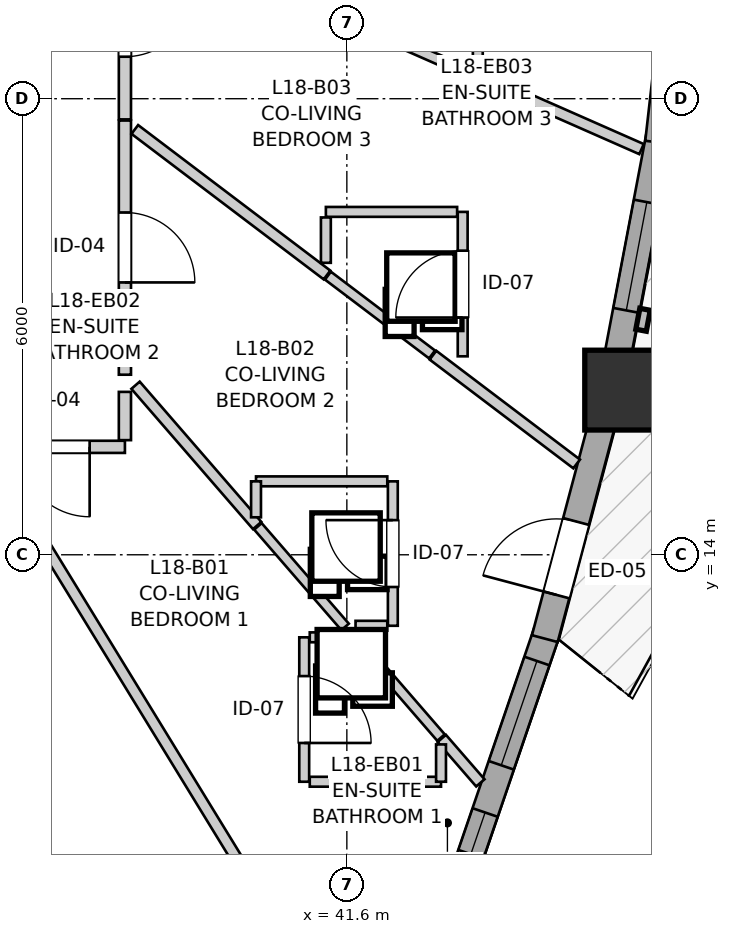
"""IFC4 building model, lengths in metres.
Left out: names, types, materials, properties, quantities, classifications, styles, units other than length and angle.
Written with IfcOpenShell. Run it as: python <this file> out.ifc"""

import sys

from ifc_helpers import new_model, si_unit, direction, frame, frame_2d, origin, origin_2d, place, context, subcontext, project, spatial, rectangle, extrude, source, transform, mapped, element, fill, save


model = new_model("IFC4")
c1 = context("Model", 3, precision=1e-05, world=origin(), true_north=direction((0.0, 1.0)))
c2 = subcontext(c1, "Body", "Model", "MODEL_VIEW")
j1 = project(units=[si_unit("LENGTHUNIT", "METRE"), si_unit("PLANEANGLEUNIT", "RADIAN")], contexts=[c1])
p1 = place(None, origin())
s1 = spatial("IfcSite", under=j1, at=p1, CompositionType="ELEMENT")
p2 = place(p1, origin())
s2 = spatial("IfcBuilding", under=s1, at=p2, CompositionType="ELEMENT")
p3 = place(p2, frame((0.0, 0.0, 62.2)))
s3 = spatial("IfcBuildingStorey", under=s2, at=p3, CompositionType="ELEMENT", Elevation=62.2)
m1 = source(origin(), c2, "Body", "SweptSolid", [
    extrude(rectangle(XDim=1.05, YDim=1.05, at=origin_2d()), origin(), (0.0, 0.0, 1.0), 2.9),
])
p4 = place(p3, frame((45.256, 16.166, 0.0), z_axis=(0.0, 0.0, 1.0), x_axis=(1.0, 0.0, 0.0)))
e1 = element("IfcColumn", 1, at=p4, inside=s3, PredefinedType="COLUMN", context=c2, shape_type="MappedRepresentation", body=[
    mapped(m1, transform((0.0, 0.0, 0.0), x_axis=(1.0, 0.0, 0.0), y_axis=(0.0, 1.0, 0.0), z_axis=(0.0, 0.0, 1.0), scale=1.0)),
])
p5 = place(p3, frame((43.104, 9.686, 0.0), z_axis=(0.0, 0.0, 1.0), x_axis=(0.323558843572, 0.946208050455, 0.0)))
e2 = element("IfcWall", 2, at=p5, inside=s3, PredefinedType="SOLIDWALL", context=c2, shape_type="SweptSolid", body=[
    extrude(rectangle(XDim=3.482, YDim=0.35, at=frame_2d((1.741, 0.0))), origin(), (0.0, 0.0, 1.0), 2.38),
])
p6 = place(p5, frame((0.396, 0.0, 0.82)))
e3 = element("IfcOpeningElement", 3, at=p6, cuts=e2, PredefinedType="OPENING", context=c2, shape_type="SweptSolid", body=[
    extrude(rectangle(XDim=0.58, YDim=1.35, at=frame_2d((0.29, 0.675))), frame((0.0, 0.185, 0.0), z_axis=(0.0, -1.0, 0.0), x_axis=(1.0, 0.0, 0.0)), (0.0, 0.0, 1.0), 0.37),
])
p7 = place(p5, frame((1.632, 0.0, 0.82)))
e4 = element("IfcOpeningElement", 4, at=p7, cuts=e2, PredefinedType="OPENING", context=c2, shape_type="SweptSolid", body=[
    extrude(rectangle(XDim=1.45, YDim=1.25, at=frame_2d((0.725, 0.625))), frame((0.0, 0.185, 0.0), z_axis=(0.0, -1.0, 0.0), x_axis=(1.0, 0.0, 0.0)), (0.0, 0.0, 1.0), 0.37),
])
p8 = place(p3, frame((44.205, 12.897, 0.0), z_axis=(0.0, 0.0, 1.0), x_axis=(0.257099428233, 0.966384956424, 0.0)))
e5 = element("IfcWall", 5, at=p8, inside=s3, PredefinedType="SOLIDWALL", context=c2, shape_type="SweptSolid", body=[
    extrude(rectangle(XDim=3.13, YDim=0.35, at=frame_2d((1.565, 0.0))), origin(), (0.0, 0.0, 1.0), 2.38),
])
p9 = place(p8, frame((0.595, 0.0, 0.0)))
e6 = element("IfcOpeningElement", 6, at=p9, cuts=e5, PredefinedType="OPENING", context=c2, shape_type="SweptSolid", body=[
    extrude(rectangle(XDim=1.0, YDim=2.1, at=frame_2d((0.5, 1.05))), frame((0.0, 0.185, 0.0), z_axis=(0.0, -1.0, 0.0), x_axis=(1.0, 0.0, 0.0)), (0.0, 0.0, 1.0), 0.37),
])
p10 = place(p3, frame((45.14, 16.494, 0.0), z_axis=(0.0, 0.0, 1.0), x_axis=(0.186608529586, 0.982434352354, 0.0)))
e7 = element("IfcWall", 7, at=p10, inside=s3, PredefinedType="SOLIDWALL", context=c2, shape_type="SweptSolid", body=[
    extrude(rectangle(XDim=3.074, YDim=0.35, at=frame_2d((1.537, 0.0))), origin(), (0.0, 0.0, 1.0), 2.38),
])
p11 = place(p10, frame((0.734, 0.0, 0.82)))
e8 = element("IfcOpeningElement", 8, at=p11, cuts=e7, PredefinedType="OPENING", context=c2, shape_type="SweptSolid", body=[
    extrude(rectangle(XDim=1.45, YDim=1.25, at=frame_2d((0.725, 0.625))), frame((0.0, 0.185, 0.0), z_axis=(0.0, -1.0, 0.0), x_axis=(1.0, 0.0, 0.0)), (0.0, 0.0, 1.0), 0.37),
])
p12 = place(p3, frame((45.7, 19.426, 0.0), z_axis=(0.0, 0.0, 1.0), x_axis=(0.113266370988, 0.993564657787, 0.0)))
e9 = element("IfcWall", 9, at=p12, inside=s3, PredefinedType="SOLIDWALL", context=c2, shape_type="SweptSolid", body=[
    extrude(rectangle(XDim=3.317, YDim=0.35, at=frame_2d((1.659, 0.0))), origin(), (0.0, 0.0, 1.0), 2.38),
])
p13 = place(p12, frame((0.869, 0.0, 0.82)))
e10 = element("IfcOpeningElement", 10, at=p13, cuts=e9, PredefinedType="OPENING", context=c2, shape_type="SweptSolid", body=[
    extrude(rectangle(XDim=1.6, YDim=1.35, at=frame_2d((0.8, 0.675))), frame((0.0, 0.185, 0.0), z_axis=(0.0, -1.0, 0.0), x_axis=(1.0, 0.0, 0.0)), (0.0, 0.0, 1.0), 0.37),
])
p14 = place(p3, frame((38.68, 19.713, 0.0), z_axis=(0.0, 0.0, 1.0), x_axis=(0.0, -1.0, 0.0)))
e11 = element("IfcWall", 11, at=p14, inside=s3, PredefinedType="PARTITIONING", context=c2, shape_type="SweptSolid", body=[
    extrude(rectangle(XDim=3.344, YDim=0.16, at=frame_2d((1.672, 0.0))), origin(), (0.0, 0.0, 1.0), 2.9),
])
p15 = place(p14, frame((1.21, 0.0, 0.0)))
e12 = element("IfcOpeningElement", 12, at=p15, cuts=e11, PredefinedType="OPENING", context=c2, shape_type="SweptSolid", body=[
    extrude(rectangle(XDim=0.92, YDim=2.1, at=frame_2d((0.46, 1.05))), frame((0.0, 0.09, 0.0), z_axis=(0.0, -1.0, 0.0), x_axis=(1.0, 0.0, 0.0)), (0.0, 0.0, 1.0), 0.18),
])
p16 = place(p3, frame((38.68, 22.348, 0.0), z_axis=(0.0, 0.0, 1.0), x_axis=(0.0, -1.0, 0.0)))
e13 = element("IfcWall", 13, at=p16, inside=s3, PredefinedType="PARTITIONING", context=c2, shape_type="SweptSolid", body=[
    extrude(rectangle(XDim=2.62, YDim=0.16, at=frame_2d((1.31, 0.0))), origin(), (0.0, 0.0, 1.0), 2.9),
])
p17 = place(p16, frame((0.875, 0.0, 0.0)))
e14 = element("IfcOpeningElement", 14, at=p17, cuts=e13, PredefinedType="OPENING", context=c2, shape_type="SweptSolid", body=[
    extrude(rectangle(XDim=0.92, YDim=2.1, at=frame_2d((0.46, 1.05))), frame((0.0, 0.09, 0.0), z_axis=(0.0, -1.0, 0.0), x_axis=(1.0, 0.0, 0.0)), (0.0, 0.0, 1.0), 0.18),
])
p18 = place(p3, frame((41.039, 12.914, 0.0), z_axis=(0.0, 0.0, 1.0), x_axis=(0.0, -1.0, 0.0)))
e15 = element("IfcWall", 15, at=p18, inside=s3, PredefinedType="PARTITIONING", context=c2, shape_type="SweptSolid", body=[
    extrude(rectangle(XDim=1.9, YDim=0.13, at=frame_2d((0.95, 0.0))), origin(), (0.0, 0.0, 1.0), 2.9),
])
p19 = place(p18, frame((0.51, 0.0, 0.0)))
e16 = element("IfcOpeningElement", 16, at=p19, cuts=e15, PredefinedType="OPENING", context=c2, shape_type="SweptSolid", body=[
    extrude(rectangle(XDim=0.88, YDim=2.05, at=frame_2d((0.44, 1.025))), frame((0.0, 0.075, 0.0), z_axis=(0.0, -1.0, 0.0), x_axis=(1.0, 0.0, 0.0)), (0.0, 0.0, 1.0), 0.15),
])
p20 = place(p3, frame((42.205, 13.066, 0.0), z_axis=(0.0, 0.0, 1.0), x_axis=(0.0, 1.0, 0.0)))
e17 = element("IfcWall", 17, at=p20, inside=s3, PredefinedType="PARTITIONING", context=c2, shape_type="SweptSolid", body=[
    extrude(rectangle(XDim=1.9, YDim=0.13, at=frame_2d((0.95, 0.0))), origin(), (0.0, 0.0, 1.0), 2.9),
])
p21 = place(p20, frame((0.51, 0.0, 0.0)))
e18 = element("IfcOpeningElement", 18, at=p21, cuts=e17, PredefinedType="OPENING", context=c2, shape_type="SweptSolid", body=[
    extrude(rectangle(XDim=0.88, YDim=2.05, at=frame_2d((0.44, 1.025))), frame((0.0, 0.075, 0.0), z_axis=(0.0, -1.0, 0.0), x_axis=(1.0, 0.0, 0.0)), (0.0, 0.0, 1.0), 0.15),
])
p22 = place(p3, frame((43.124, 16.611, 0.0), z_axis=(0.0, 0.0, 1.0), x_axis=(0.0, 1.0, 0.0)))
e19 = element("IfcWall", 19, at=p22, inside=s3, PredefinedType="PARTITIONING", context=c2, shape_type="SweptSolid", body=[
    extrude(rectangle(XDim=1.9, YDim=0.13, at=frame_2d((0.95, 0.0))), origin(), (0.0, 0.0, 1.0), 2.9),
])
p23 = place(p22, frame((0.51, 0.0, 0.0)))
e20 = element("IfcOpeningElement", 20, at=p23, cuts=e19, PredefinedType="OPENING", context=c2, shape_type="SweptSolid", body=[
    extrude(rectangle(XDim=0.88, YDim=2.05, at=frame_2d((0.44, 1.025))), frame((0.0, 0.075, 0.0), z_axis=(0.0, -1.0, 0.0), x_axis=(1.0, 0.0, 0.0)), (0.0, 0.0, 1.0), 0.15),
])
p24 = place(p3, frame((43.323, 20.286, 0.0), z_axis=(0.0, 0.0, 1.0), x_axis=(0.0, 1.0, 0.0)))
e21 = element("IfcWall", 21, at=p24, inside=s3, PredefinedType="PARTITIONING", context=c2, shape_type="SweptSolid", body=[
    extrude(rectangle(XDim=1.845, YDim=0.13, at=frame_2d((0.923, 0.0))), origin(), (0.0, 0.0, 1.0), 2.9),
])
p25 = place(p24, frame((0.482, 0.0, 0.0)))
e22 = element("IfcOpeningElement", 22, at=p25, cuts=e21, PredefinedType="OPENING", context=c2, shape_type="SweptSolid", body=[
    extrude(rectangle(XDim=0.88, YDim=2.05, at=frame_2d((0.44, 1.025))), frame((0.0, 0.075, 0.0), z_axis=(0.0, -1.0, 0.0), x_axis=(1.0, 0.0, 0.0)), (0.0, 0.0, 1.0), 0.15),
])
p26 = place(p3, frame((38.68, 15.42, 0.0), z_axis=(0.0, 0.0, 1.0), x_axis=(-1.0, 0.0, 0.0)))
e23 = element("IfcWall", 23, at=p26, inside=s3, PredefinedType="PARTITIONING", context=c2, shape_type="SweptSolid", body=[
    extrude(rectangle(XDim=1.816, YDim=0.16, at=frame_2d((0.908, 0.0))), origin(), (0.0, 0.0, 1.0), 2.9),
])
p27 = place(p26, frame((0.464, 0.0, 0.0)))
e24 = element("IfcOpeningElement", 24, at=p27, cuts=e23, PredefinedType="OPENING", context=c2, shape_type="SweptSolid", body=[
    extrude(rectangle(XDim=0.92, YDim=2.1, at=frame_2d((0.46, 1.05))), frame((0.0, 0.09, 0.0), z_axis=(0.0, -1.0, 0.0), x_axis=(1.0, 0.0, 0.0)), (0.0, 0.0, 1.0), 0.18),
])
p28 = place(p3, frame((36.908, 15.295, 0.0), z_axis=(0.0, 0.0, 1.0), x_axis=(0.522407183079, -0.852696156358, 0.0)))
e25 = element("IfcWall", 25, at=p28, inside=s3, PredefinedType="PARTITIONING", context=c2, shape_type="SweptSolid", body=[
    extrude(rectangle(XDim=9.87, YDim=0.145, at=frame_2d((4.935, 0.0))), origin(), (0.0, 0.0, 1.0), 2.9),
])
p29 = place(p3, frame((38.81, 19.595, 0.0), z_axis=(0.0, 0.0, 1.0), x_axis=(0.797304275437, -0.603577577756, 0.0)))
e26 = element("IfcWall", 26, at=p29, inside=s3, PredefinedType="PARTITIONING", context=c2, shape_type="SweptSolid", body=[
    extrude(rectangle(XDim=3.172, YDim=0.145, at=frame_2d((1.586, 0.0))), origin(), (0.0, 0.0, 1.0), 2.9),
])
p30 = place(p3, frame((38.82, 16.23, 0.0), z_axis=(0.0, 0.0, 1.0), x_axis=(0.655037088123, -0.755596726556, 0.0)))
e27 = element("IfcWall", 27, at=p30, inside=s3, PredefinedType="PARTITIONING", context=c2, shape_type="SweptSolid", body=[
    extrude(rectangle(XDim=2.442, YDim=0.145, at=frame_2d((1.221, 0.0))), origin(), (0.0, 0.0, 1.0), 2.9),
])
p31 = place(p3, frame((43.41, 20.248, 0.0), z_axis=(0.0, 0.0, 1.0), x_axis=(0.915032786041, -0.403379474527, 0.0)))
e28 = element("IfcWall", 28, at=p31, inside=s3, PredefinedType="PARTITIONING", context=c2, shape_type="SweptSolid", body=[
    extrude(rectangle(XDim=2.259, YDim=0.145, at=frame_2d((1.13, 0.0))), origin(), (0.0, 0.0, 1.0), 2.9),
])
p32 = place(p3, frame((42.733, 16.626, 0.0), z_axis=(0.0, 0.0, 1.0), x_axis=(0.797372907097, -0.603486907089, 0.0)))
e29 = element("IfcWall", 29, at=p32, inside=s3, PredefinedType="PARTITIONING", context=c2, shape_type="SweptSolid", body=[
    extrude(rectangle(XDim=2.371, YDim=0.145, at=frame_2d((1.186, 0.0))), origin(), (0.0, 0.0, 1.0), 2.9),
])
p33 = place(p3, frame((41.65, 21.023, 0.0), z_axis=(0.0, 0.0, 1.0), x_axis=(0.915165742406, -0.403077739309, 0.0)))
e30 = element("IfcWall", 30, at=p33, inside=s3, PredefinedType="PARTITIONING", context=c2, shape_type="SweptSolid", body=[
    extrude(rectangle(XDim=1.689, YDim=0.13, at=frame_2d((0.844, 0.0))), origin(), (0.0, 0.0, 1.0), 2.9),
])
for number, where, z_axis, x_axis in (
    (31, (41.324, 18.511, 0.0), (0.0, 0.0, 1.0), (1.0, 0.0, 0.0)),
    (32, (41.112, 11.014, 0.0), (0.0, 0.0, 1.0), (1.0, 0.0, 0.0)),
    (33, (40.405, 14.966, 0.0), (0.0, 0.0, 1.0), (1.0, 0.0, 0.0)),
):
    element("IfcWall", number, at=place(p3, frame(where, z_axis=z_axis, x_axis=x_axis)), inside=s3, PredefinedType="PARTITIONING", context=c2, shape_type="SweptSolid", body=[
        extrude(rectangle(XDim=1.727, YDim=0.13, at=frame_2d((0.864, 0.0))), origin(), (0.0, 0.0, 1.0), 2.9),
    ])
p34 = place(p3, frame((40.43, 14.374, 0.0), z_axis=(0.0, 0.0, 1.0), x_axis=(0.655121637619, -0.755523421162, 0.0)))
e34 = element("IfcWall", 34, at=p34, inside=s3, PredefinedType="PARTITIONING", context=c2, shape_type="SweptSolid", body=[
    extrude(rectangle(XDim=1.751, YDim=0.13, at=frame_2d((0.875, 0.0))), origin(), (0.0, 0.0, 1.0), 2.9),
])
p35 = place(p3, frame((41.696, 12.914, 0.0), z_axis=(0.0, 0.0, 1.0), x_axis=(0.654882611276, -0.755730616985, 0.0)))
e35 = element("IfcWall", 35, at=p35, inside=s3, PredefinedType="PARTITIONING", context=c2, shape_type="SweptSolid", body=[
    extrude(rectangle(XDim=1.745, YDim=0.13, at=frame_2d((0.873, 0.0))), origin(), (0.0, 0.0, 1.0), 2.9),
])
p36 = place(p3, frame((41.351, 17.672, 0.0), z_axis=(0.0, 0.0, 1.0), x_axis=(0.797400841938, -0.603449995672, 0.0)))
e36 = element("IfcWall", 36, at=p36, inside=s3, PredefinedType="PARTITIONING", context=c2, shape_type="SweptSolid", body=[
    extrude(rectangle(XDim=1.718, YDim=0.13, at=frame_2d((0.859, 0.0))), origin(), (0.0, 0.0, 1.0), 2.9),
])
p37 = place(p3, frame((38.68, 15.508, 0.0), z_axis=(0.0, 0.0, 1.0), x_axis=(0.0, 1.0, 0.0)))
e37 = element("IfcWall", 37, at=p37, inside=s3, PredefinedType="PARTITIONING", context=c2, shape_type="SweptSolid", body=[
    extrude(rectangle(XDim=0.635, YDim=0.16, at=frame_2d((0.317, 0.0))), origin(), (0.0, 0.0, 1.0), 2.9),
])
p38 = place(p3, frame((41.324, 17.841, 0.0), z_axis=(0.0, 0.0, 1.0), x_axis=(0.0, 1.0, 0.0)))
e38 = element("IfcWall", 38, at=p38, inside=s3, PredefinedType="PARTITIONING", context=c2, shape_type="SweptSolid", body=[
    extrude(rectangle(XDim=0.597, YDim=0.13, at=frame_2d((0.298, 0.0))), origin(), (0.0, 0.0, 1.0), 2.9),
])
p39 = place(p3, frame((42.849, 11.584, 0.0), z_axis=(0.0, 0.0, 1.0), x_axis=(0.655530542193, -0.755168662123, 0.0)))
e39 = element("IfcWall", 39, at=p39, inside=s3, PredefinedType="PARTITIONING", context=c2, shape_type="SweptSolid", body=[
    extrude(rectangle(XDim=0.774, YDim=0.145, at=frame_2d((0.387, 0.0))), origin(), (0.0, 0.0, 1.0), 2.9),
])
p40 = place(p3, frame((41.112, 12.914, 0.0), z_axis=(0.0, 0.0, 1.0), x_axis=(1.0, 0.0, 0.0)))
e40 = element("IfcWall", 40, at=p40, inside=s3, PredefinedType="PARTITIONING", context=c2, shape_type="SweptSolid", body=[
    extrude(rectangle(XDim=0.434, YDim=0.13, at=frame_2d((0.217, 0.0))), origin(), (0.0, 0.0, 1.0), 2.9),
])
p41 = place(p3, frame((41.714, 13.066, 0.0), z_axis=(0.0, 0.0, 1.0), x_axis=(1.0, 0.0, 0.0)))
e41 = element("IfcWall", 41, at=p41, inside=s3, PredefinedType="PARTITIONING", context=c2, shape_type="SweptSolid", body=[
    extrude(rectangle(XDim=0.418, YDim=0.13, at=frame_2d((0.209, 0.0))), origin(), (0.0, 0.0, 1.0), 2.9),
])
p42 = place(p3, frame((42.839, 11.014, 0.0), z_axis=(0.0, 0.0, 1.0), x_axis=(0.0, 1.0, 0.0)))
e42 = element("IfcWall", 42, at=p42, inside=s3, PredefinedType="PARTITIONING", context=c2, shape_type="SweptSolid", body=[
    extrude(rectangle(XDim=0.491, YDim=0.13, at=frame_2d((0.246, 0.0))), origin(), (0.0, 0.0, 1.0), 2.9),
])
p43 = place(p3, frame((40.405, 14.493, 0.0), z_axis=(0.0, 0.0, 1.0), x_axis=(0.0, 1.0, 0.0)))
e43 = element("IfcWall", 43, at=p43, inside=s3, PredefinedType="PARTITIONING", context=c2, shape_type="SweptSolid", body=[
    extrude(rectangle(XDim=0.473, YDim=0.13, at=frame_2d((0.237, 0.0))), origin(), (0.0, 0.0, 1.0), 2.9),
])
m2 = source(origin(), c2, "Body", "SweptSolid", [
    extrude(rectangle(XDim=0.58, YDim=1.35, at=frame_2d((0.29, 0.675))), frame((0.0, 0.03, 0.0), z_axis=(0.0, -1.0, 0.0), x_axis=(1.0, 0.0, 0.0)), (0.0, 0.0, 1.0), 0.06),
])
p44 = place(p6, origin())
e44 = element("IfcWindow", 44, at=p44, inside=s3, PartitioningType="SINGLE_PANEL", PredefinedType="WINDOW", context=c2, shape_type="MappedRepresentation", body=[
    mapped(m2, transform((0.0, 0.0, 0.0), x_axis=(1.0, 0.0, 0.0), y_axis=(0.0, 1.0, 0.0), z_axis=(0.0, 0.0, 1.0), scale=1.0)),
])
fill(e3, e44)
m3 = source(origin(), c2, "Body", "SweptSolid", [
    extrude(rectangle(XDim=1.45, YDim=1.25, at=frame_2d((0.725, 0.625))), frame((0.0, 0.03, 0.0), z_axis=(0.0, -1.0, 0.0), x_axis=(1.0, 0.0, 0.0)), (0.0, 0.0, 1.0), 0.06),
])
p45 = place(p7, origin())
e45 = element("IfcWindow", 45, at=p45, inside=s3, PartitioningType="SINGLE_PANEL", PredefinedType="WINDOW", context=c2, shape_type="MappedRepresentation", body=[
    mapped(m3, transform((0.0, 0.0, 0.0), x_axis=(1.0, 0.0, 0.0), y_axis=(0.0, 1.0, 0.0), z_axis=(0.0, 0.0, 1.0), scale=1.0)),
])
fill(e4, e45)
p46 = place(p11, origin())
e46 = element("IfcWindow", 46, at=p46, inside=s3, PartitioningType="SINGLE_PANEL", PredefinedType="WINDOW", context=c2, shape_type="MappedRepresentation", body=[
    mapped(m3, transform((0.0, 0.0, 0.0), x_axis=(1.0, 0.0, 0.0), y_axis=(0.0, 1.0, 0.0), z_axis=(0.0, 0.0, 1.0), scale=1.0)),
])
fill(e8, e46)
m4 = source(origin(), c2, "Body", "SweptSolid", [
    extrude(rectangle(XDim=1.0, YDim=2.1, at=frame_2d((0.5, 1.05))), frame((0.0, 0.025, 0.0), z_axis=(0.0, -1.0, 0.0), x_axis=(1.0, 0.0, 0.0)), (0.0, 0.0, 1.0), 0.05),
])
p47 = place(p9, origin())
e47 = element("IfcDoor", 47, at=p47, inside=s3, OperationType="SINGLE_SWING_LEFT", PredefinedType="DOOR", context=c2, shape_type="MappedRepresentation", body=[
    mapped(m4, transform((0.0, 0.0, 0.0), x_axis=(1.0, 0.0, 0.0), y_axis=(0.0, 1.0, 0.0), z_axis=(0.0, 0.0, 1.0), scale=1.0)),
])
fill(e6, e47)
m5 = source(origin(), c2, "Body", "SweptSolid", [
    extrude(rectangle(XDim=0.92, YDim=2.1, at=frame_2d((0.46, 1.05))), frame((0.0, 0.025, 0.0), z_axis=(0.0, -1.0, 0.0), x_axis=(1.0, 0.0, 0.0)), (0.0, 0.0, 1.0), 0.05),
])
p48 = place(p15, origin())
e48 = element("IfcDoor", 48, at=p48, inside=s3, OperationType="SINGLE_SWING_RIGHT", PredefinedType="DOOR", context=c2, shape_type="MappedRepresentation", body=[
    mapped(m5, transform((0.0, 0.0, 0.0), x_axis=(1.0, 0.0, 0.0), y_axis=(0.0, 1.0, 0.0), z_axis=(0.0, 0.0, 1.0), scale=1.0)),
])
fill(e12, e48)
p49 = place(p17, origin())
e49 = element("IfcDoor", 49, at=p49, inside=s3, OperationType="SINGLE_SWING_LEFT", PredefinedType="DOOR", context=c2, shape_type="MappedRepresentation", body=[
    mapped(m5, transform((0.0, 0.0, 0.0), x_axis=(1.0, 0.0, 0.0), y_axis=(0.0, 1.0, 0.0), z_axis=(0.0, 0.0, 1.0), scale=1.0)),
])
fill(e14, e49)
m6 = source(origin(), c2, "Body", "SweptSolid", [
    extrude(rectangle(XDim=0.88, YDim=2.05, at=frame_2d((0.44, 1.025))), frame((0.0, 0.025, 0.0), z_axis=(0.0, -1.0, 0.0), x_axis=(1.0, 0.0, 0.0)), (0.0, 0.0, 1.0), 0.05),
])
p50 = place(p19, origin())
e50 = element("IfcDoor", 50, at=p50, inside=s3, OperationType="SINGLE_SWING_RIGHT", PredefinedType="DOOR", context=c2, shape_type="MappedRepresentation", body=[
    mapped(m6, transform((0.0, 0.0, 0.0), x_axis=(1.0, 0.0, 0.0), y_axis=(0.0, 1.0, 0.0), z_axis=(0.0, 0.0, 1.0), scale=1.0)),
])
fill(e16, e50)
p51 = place(p21, origin())
e51 = element("IfcDoor", 51, at=p51, inside=s3, OperationType="SINGLE_SWING_RIGHT", PredefinedType="DOOR", context=c2, shape_type="MappedRepresentation", body=[
    mapped(m6, transform((0.0, 0.0, 0.0), x_axis=(1.0, 0.0, 0.0), y_axis=(0.0, 1.0, 0.0), z_axis=(0.0, 0.0, 1.0), scale=1.0)),
])
fill(e18, e51)
p52 = place(p23, origin())
e52 = element("IfcDoor", 52, at=p52, inside=s3, OperationType="SINGLE_SWING_LEFT", PredefinedType="DOOR", context=c2, shape_type="MappedRepresentation", body=[
    mapped(m6, transform((0.0, 0.0, 0.0), x_axis=(1.0, 0.0, 0.0), y_axis=(0.0, 1.0, 0.0), z_axis=(0.0, 0.0, 1.0), scale=1.0)),
])
fill(e20, e52)
p53 = place(p27, origin())
e53 = element("IfcDoor", 53, at=p53, inside=s3, OperationType="SINGLE_SWING_LEFT", PredefinedType="DOOR", context=c2, shape_type="MappedRepresentation", body=[
    mapped(m5, transform((0.0, 0.0, 0.0), x_axis=(1.0, 0.0, 0.0), y_axis=(0.0, 1.0, 0.0), z_axis=(0.0, 0.0, 1.0), scale=1.0)),
])
fill(e24, e53)
save(model, sys.argv[1])
